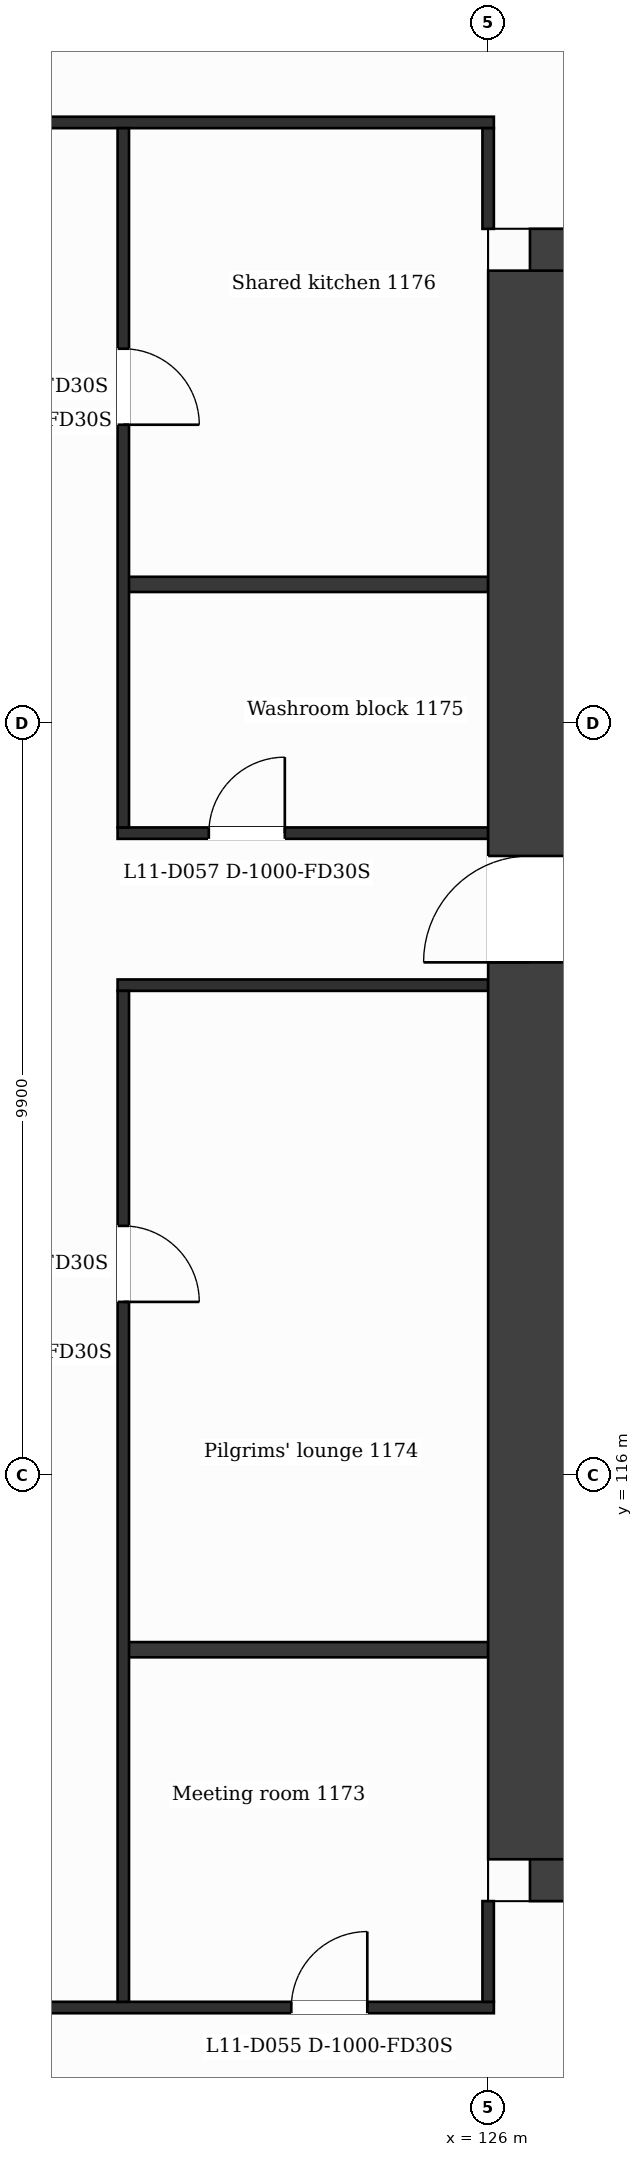
"""IFC4 building model, lengths in metres.
Left out: names, types, materials, properties, quantities, classifications, styles, units other than length and angle.
Written with IfcOpenShell. Run it as: python <this file> out.ifc"""

import sys

from ifc_helpers import new_model, si_unit, direction, frame, frame_2d, origin, place, context, subcontext, project, spatial, rectangle, extrude, element, fill, save


model = new_model("IFC4")
c1 = context("Model", 3, precision=1e-05, world=origin(), true_north=direction((0.0, 1.0)))
c2 = subcontext(c1, "Body", "Model", "MODEL_VIEW")
j1 = project(units=[si_unit("LENGTHUNIT", "METRE"), si_unit("PLANEANGLEUNIT", "RADIAN")], contexts=[c1])
p1 = place(None, origin())
s1 = spatial("IfcSite", under=j1, at=p1, CompositionType="ELEMENT")
p2 = place(p1, origin())
s2 = spatial("IfcBuilding", under=s1, at=p2, CompositionType="ELEMENT")
p3 = place(p2, frame((0.0, 0.0, 56.5)))
s3 = spatial("IfcBuildingStorey", under=s2, at=p3, CompositionType="ELEMENT", Elevation=56.5)
p4 = place(p3, frame((126.55, 131.85, 0.0), z_axis=(0.0, 0.0, 1.0), x_axis=(1.0, 0.0, 0.0)))
e1 = element("IfcWall", 1, at=p4, inside=s3, PredefinedType="SHEAR", context=c2, shape_type="SweptSolid", body=[
    extrude(rectangle(XDim=11.138, YDim=1.1, at=frame_2d((5.569, 0.0))), origin(), (0.0, 0.0, 1.0), 3.5),
])
p5 = place(p4, frame((3.386, 0.0, 0.0)))
e2 = element("IfcOpeningElement", 2, at=p5, cuts=e1, PredefinedType="OPENING", context=c2, shape_type="SweptSolid", body=[
    extrude(rectangle(XDim=1.2, YDim=2.1, at=frame_2d((0.6, 1.05))), frame((0.0, 0.56, 0.0), z_axis=(0.0, -1.0, 0.0), x_axis=(1.0, 0.0, 0.0)), (0.0, 0.0, 1.0), 1.12),
])
p6 = place(p3, frame((140.502, 110.95, 0.0), z_axis=(0.0, 0.0, 1.0), x_axis=(-1.0, 0.0, 0.0)))
e3 = element("IfcWall", 3, at=p6, inside=s3, PredefinedType="SHEAR", context=c2, shape_type="SweptSolid", body=[
    extrude(rectangle(XDim=13.952, YDim=1.1, at=frame_2d((6.976, 0.0))), origin(), (0.0, 0.0, 1.0), 3.5),
])
p7 = place(p6, frame((6.804, 0.0, 0.0)))
e4 = element("IfcOpeningElement", 4, at=p7, cuts=e3, PredefinedType="OPENING", context=c2, shape_type="SweptSolid", body=[
    extrude(rectangle(XDim=1.4, YDim=2.1, at=frame_2d((0.7, 1.05))), frame((0.0, 0.56, 0.0), z_axis=(0.0, -1.0, 0.0), x_axis=(1.0, 0.0, 0.0)), (0.0, 0.0, 1.0), 1.12),
])
p8 = place(p3, frame((126.55, 110.95, 0.0), z_axis=(0.0, 0.0, 1.0), x_axis=(0.0, 1.0, 0.0)))
e5 = element("IfcWall", 5, at=p8, inside=s3, PredefinedType="SHEAR", context=c2, shape_type="SweptSolid", body=[
    extrude(rectangle(XDim=20.9, YDim=1.1, at=frame_2d((10.45, 0.0))), origin(), (0.0, 0.0, 1.0), 3.5),
])
p9 = place(p8, frame((11.8, 0.0, 0.0)))
e6 = element("IfcOpeningElement", 6, at=p9, cuts=e5, PredefinedType="OPENING", context=c2, shape_type="SweptSolid", body=[
    extrude(rectangle(XDim=1.4, YDim=2.1, at=frame_2d((0.7, 1.05))), frame((0.0, 0.56, 0.0), z_axis=(0.0, -1.0, 0.0), x_axis=(1.0, 0.0, 0.0)), (0.0, 0.0, 1.0), 1.12),
])
p10 = place(p3, frame((100.725, 109.0, 0.0), z_axis=(0.0, 0.0, 1.0), x_axis=(1.0, 0.0, 0.0)))
e7 = element("IfcWall", 7, at=p10, inside=s3, PredefinedType="PARTITIONING", context=c2, shape_type="SweptSolid", body=[
    extrude(rectangle(XDim=25.35, YDim=0.15, at=frame_2d((12.675, 0.0))), origin(), (0.0, 0.0, 1.0), 3.18),
])
p11 = place(p10, frame((1.975, 0.0, 0.0)))
e8 = element("IfcOpeningElement", 8, at=p11, cuts=e7, PredefinedType="OPENING", context=c2, shape_type="SweptSolid", body=[
    extrude(rectangle(XDim=1.0, YDim=2.1, at=frame_2d((0.5, 1.05))), frame((0.0, 0.085, 0.0), z_axis=(0.0, -1.0, 0.0), x_axis=(1.0, 0.0, 0.0)), (0.0, 0.0, 1.0), 0.17),
])
p12 = place(p10, frame((10.325, 0.0, 0.0)))
e9 = element("IfcOpeningElement", 9, at=p12, cuts=e7, PredefinedType="OPENING", context=c2, shape_type="SweptSolid", body=[
    extrude(rectangle(XDim=1.0, YDim=2.1, at=frame_2d((0.5, 1.05))), frame((0.0, 0.085, 0.0), z_axis=(0.0, -1.0, 0.0), x_axis=(1.0, 0.0, 0.0)), (0.0, 0.0, 1.0), 0.17),
])
p13 = place(p10, frame((14.9, 0.0, 0.0)))
e10 = element("IfcOpeningElement", 10, at=p13, cuts=e7, PredefinedType="OPENING", context=c2, shape_type="SweptSolid", body=[
    extrude(rectangle(XDim=1.0, YDim=2.1, at=frame_2d((0.5, 1.05))), frame((0.0, 0.085, 0.0), z_axis=(0.0, -1.0, 0.0), x_axis=(1.0, 0.0, 0.0)), (0.0, 0.0, 1.0), 0.17),
])
p14 = place(p10, frame((22.685, 0.0, 0.0)))
e11 = element("IfcOpeningElement", 11, at=p14, cuts=e7, PredefinedType="OPENING", context=c2, shape_type="SweptSolid", body=[
    extrude(rectangle(XDim=1.0, YDim=2.1, at=frame_2d((0.5, 1.05))), frame((0.0, 0.085, 0.0), z_axis=(0.0, -1.0, 0.0), x_axis=(1.0, 0.0, 0.0)), (0.0, 0.0, 1.0), 0.17),
])
p15 = place(p3, frame((121.2, 113.708, 0.0), z_axis=(0.0, 0.0, 1.0), x_axis=(1.0, 0.0, 0.0)))
e12 = element("IfcWall", 12, at=p15, inside=s3, PredefinedType="PARTITIONING", context=c2, shape_type="SweptSolid", body=[
    extrude(rectangle(XDim=4.8, YDim=0.2, at=frame_2d((2.4, 0.0))), origin(), (0.0, 0.0, 1.0), 3.18),
])
p16 = place(p3, frame((121.125, 122.45, 0.0), z_axis=(0.0, 0.0, 1.0), x_axis=(1.0, 0.0, 0.0)))
e13 = element("IfcWall", 13, at=p16, inside=s3, PredefinedType="PARTITIONING", context=c2, shape_type="SweptSolid", body=[
    extrude(rectangle(XDim=4.875, YDim=0.15, at=frame_2d((2.438, 0.0))), origin(), (0.0, 0.0, 1.0), 3.18),
])
p17 = place(p3, frame((121.125, 124.45, 0.0), z_axis=(0.0, 0.0, 1.0), x_axis=(1.0, 0.0, 0.0)))
e14 = element("IfcWall", 14, at=p17, inside=s3, PredefinedType="PARTITIONING", context=c2, shape_type="SweptSolid", body=[
    extrude(rectangle(XDim=4.875, YDim=0.15, at=frame_2d((2.438, 0.0))), origin(), (0.0, 0.0, 1.0), 3.18),
])
p18 = place(p17, frame((1.2, 0.0, 0.0)))
e15 = element("IfcOpeningElement", 15, at=p18, cuts=e14, PredefinedType="OPENING", context=c2, shape_type="SweptSolid", body=[
    extrude(rectangle(XDim=1.0, YDim=2.1, at=frame_2d((0.5, 1.05))), frame((0.0, 0.085, 0.0), z_axis=(0.0, -1.0, 0.0), x_axis=(1.0, 0.0, 0.0)), (0.0, 0.0, 1.0), 0.17),
])
p19 = place(p3, frame((121.2, 127.722, 0.0), z_axis=(0.0, 0.0, 1.0), x_axis=(1.0, 0.0, 0.0)))
e16 = element("IfcWall", 16, at=p19, inside=s3, PredefinedType="PARTITIONING", context=c2, shape_type="SweptSolid", body=[
    extrude(rectangle(XDim=4.8, YDim=0.2, at=frame_2d((2.4, 0.0))), origin(), (0.0, 0.0, 1.0), 3.18),
])
p20 = place(p3, frame((100.725, 133.8, 0.0), z_axis=(0.0, 0.0, 1.0), x_axis=(1.0, 0.0, 0.0)))
e17 = element("IfcWall", 17, at=p20, inside=s3, PredefinedType="PARTITIONING", context=c2, shape_type="SweptSolid", body=[
    extrude(rectangle(XDim=25.35, YDim=0.15, at=frame_2d((12.675, 0.0))), origin(), (0.0, 0.0, 1.0), 3.18),
])
p21 = place(p3, frame((121.2, 109.075, 0.0), z_axis=(0.0, 0.0, 1.0), x_axis=(0.0, 1.0, 0.0)))
e18 = element("IfcWall", 18, at=p21, inside=s3, PredefinedType="PARTITIONING", context=c2, shape_type="SweptSolid", body=[
    extrude(rectangle(XDim=13.3, YDim=0.15, at=frame_2d((6.65, 0.0))), origin(), (0.0, 0.0, 1.0), 3.18),
])
p22 = place(p21, frame((9.208, 0.0, 0.0)))
e19 = element("IfcOpeningElement", 19, at=p22, cuts=e18, PredefinedType="OPENING", context=c2, shape_type="SweptSolid", body=[
    extrude(rectangle(XDim=1.0, YDim=2.1, at=frame_2d((0.5, 1.05))), frame((0.0, 0.085, 0.0), z_axis=(0.0, -1.0, 0.0), x_axis=(1.0, 0.0, 0.0)), (0.0, 0.0, 1.0), 0.17),
])
p23 = place(p3, frame((121.2, 124.525, 0.0), z_axis=(0.0, 0.0, 1.0), x_axis=(0.0, 1.0, 0.0)))
e20 = element("IfcWall", 20, at=p23, inside=s3, PredefinedType="PARTITIONING", context=c2, shape_type="SweptSolid", body=[
    extrude(rectangle(XDim=9.2, YDim=0.15, at=frame_2d((4.6, 0.0))), origin(), (0.0, 0.0, 1.0), 3.18),
])
p24 = place(p23, frame((5.298, 0.0, 0.0)))
e21 = element("IfcOpeningElement", 21, at=p24, cuts=e20, PredefinedType="OPENING", context=c2, shape_type="SweptSolid", body=[
    extrude(rectangle(XDim=1.0, YDim=2.1, at=frame_2d((0.5, 1.05))), frame((0.0, 0.085, 0.0), z_axis=(0.0, -1.0, 0.0), x_axis=(1.0, 0.0, 0.0)), (0.0, 0.0, 1.0), 0.17),
])
p25 = place(p3, frame((126.0, 109.075, 0.0), z_axis=(0.0, 0.0, 1.0), x_axis=(0.0, 1.0, 0.0)))
e22 = element("IfcWall", 22, at=p25, inside=s3, PredefinedType="PARTITIONING", context=c2, shape_type="SweptSolid", body=[
    extrude(rectangle(XDim=1.325, YDim=0.15, at=frame_2d((0.663, 0.0))), origin(), (0.0, 0.0, 1.0), 3.18),
])
p26 = place(p3, frame((126.0, 132.4, 0.0), z_axis=(0.0, 0.0, 1.0), x_axis=(0.0, 1.0, 0.0)))
e23 = element("IfcWall", 23, at=p26, inside=s3, PredefinedType="PARTITIONING", context=c2, shape_type="SweptSolid", body=[
    extrude(rectangle(XDim=1.325, YDim=0.15, at=frame_2d((0.663, 0.0))), origin(), (0.0, 0.0, 1.0), 3.18),
])
p27 = place(p14, origin())
e24 = element("IfcDoor", 24, at=p27, inside=s3, OperationType="SINGLE_SWING_RIGHT", PredefinedType="DOOR", context=c2, shape_type="SweptSolid", body=[
    extrude(rectangle(XDim=1.0, YDim=2.1, at=frame_2d((0.5, 1.05))), frame((0.0, 0.025, 0.0), z_axis=(0.0, -1.0, 0.0), x_axis=(1.0, 0.0, 0.0)), (0.0, 0.0, 1.0), 0.05),
])
fill(e11, e24)
p28 = place(p22, origin())
e25 = element("IfcDoor", 25, at=p28, inside=s3, OperationType="SINGLE_SWING_LEFT", PredefinedType="DOOR", context=c2, shape_type="SweptSolid", body=[
    extrude(rectangle(XDim=1.0, YDim=2.1, at=frame_2d((0.5, 1.05))), frame((0.0, 0.025, 0.0), z_axis=(0.0, -1.0, 0.0), x_axis=(1.0, 0.0, 0.0)), (0.0, 0.0, 1.0), 0.05),
])
fill(e19, e25)
p29 = place(p18, origin())
e26 = element("IfcDoor", 26, at=p29, inside=s3, OperationType="SINGLE_SWING_RIGHT", PredefinedType="DOOR", context=c2, shape_type="SweptSolid", body=[
    extrude(rectangle(XDim=1.0, YDim=2.1, at=frame_2d((0.5, 1.05))), frame((0.0, 0.025, 0.0), z_axis=(0.0, -1.0, 0.0), x_axis=(1.0, 0.0, 0.0)), (0.0, 0.0, 1.0), 0.05),
])
fill(e15, e26)
p30 = place(p24, origin())
e27 = element("IfcDoor", 27, at=p30, inside=s3, OperationType="SINGLE_SWING_LEFT", PredefinedType="DOOR", context=c2, shape_type="SweptSolid", body=[
    extrude(rectangle(XDim=1.0, YDim=2.1, at=frame_2d((0.5, 1.05))), frame((0.0, 0.025, 0.0), z_axis=(0.0, -1.0, 0.0), x_axis=(1.0, 0.0, 0.0)), (0.0, 0.0, 1.0), 0.05),
])
fill(e21, e27)
p31 = place(p9, origin())
e28 = element("IfcDoor", 28, at=p31, inside=s3, OperationType="SINGLE_SWING_LEFT", PredefinedType="DOOR", context=c2, shape_type="SweptSolid", body=[
    extrude(rectangle(XDim=1.4, YDim=2.1, at=frame_2d((0.7, 1.05))), frame((0.0, 0.025, 0.0), z_axis=(0.0, -1.0, 0.0), x_axis=(1.0, 0.0, 0.0)), (0.0, 0.0, 1.0), 0.05),
])
fill(e6, e28)
save(model, sys.argv[1])
